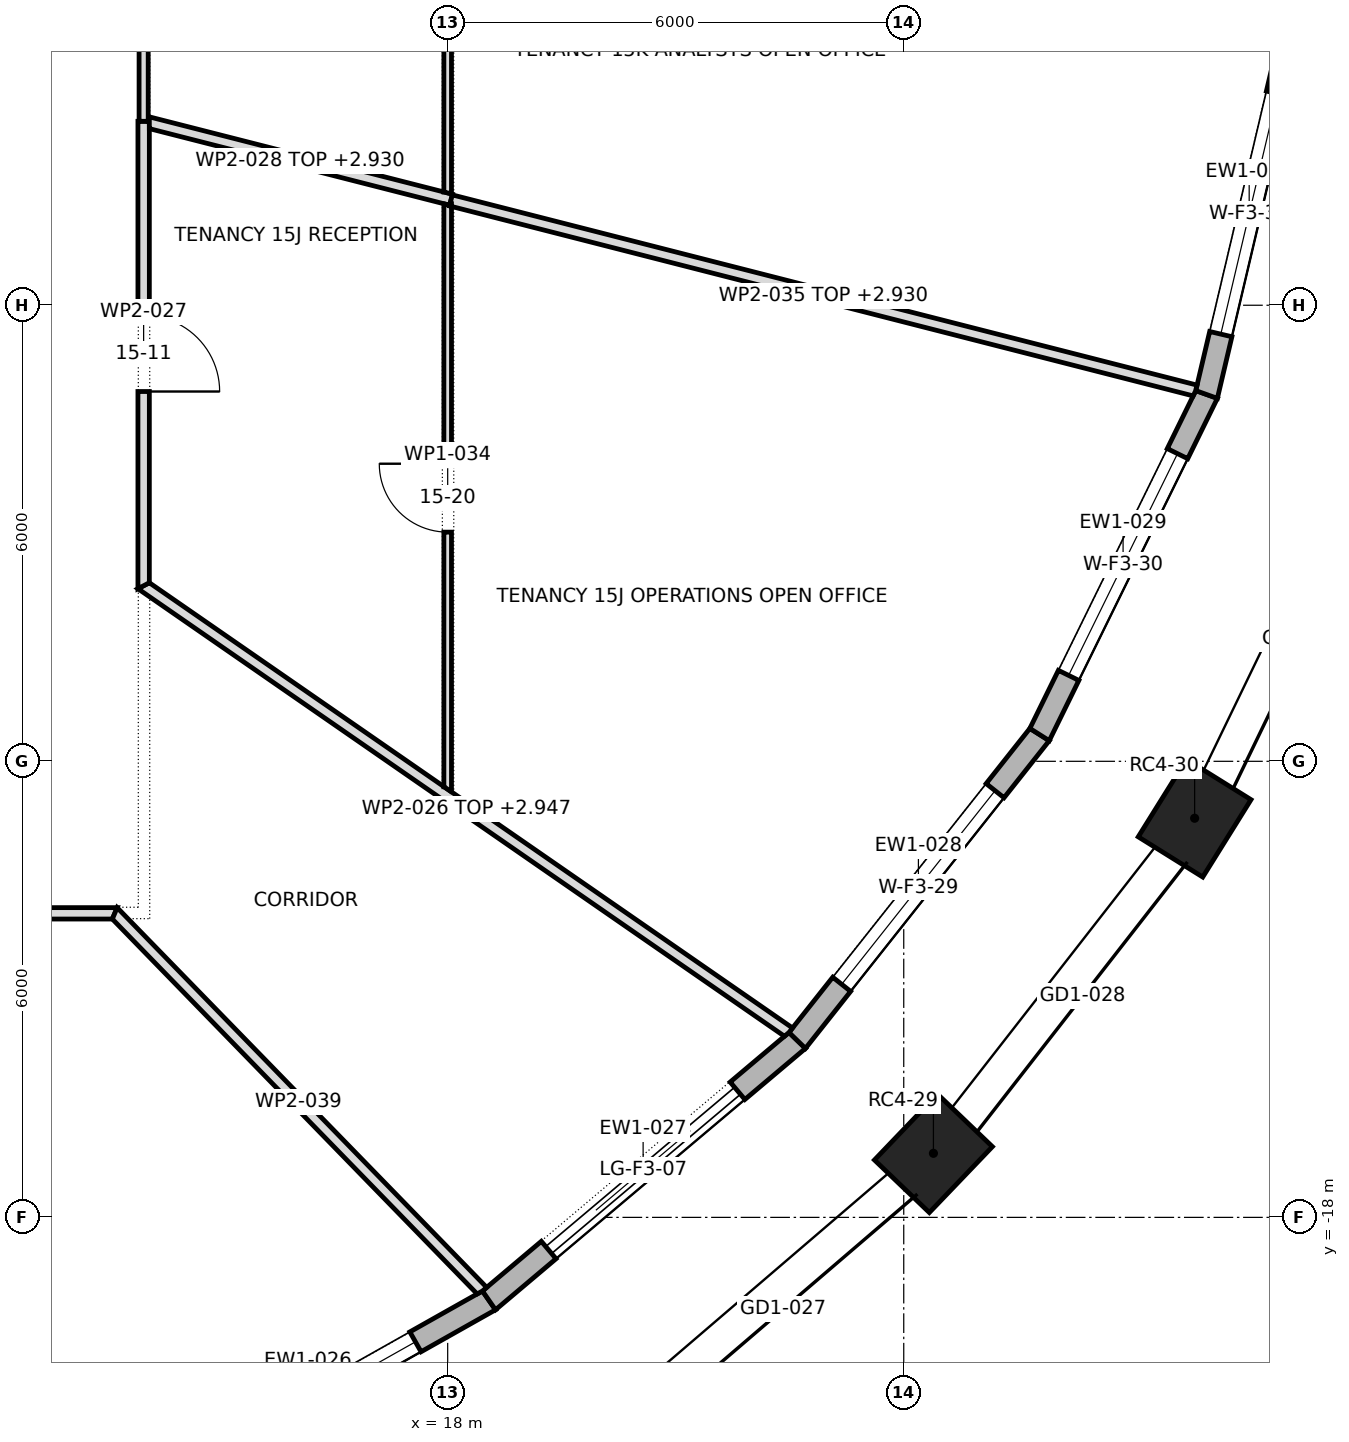
"""IFC4 building model, lengths in metres.
Left out: names, types, materials, properties, quantities, classifications, styles, units other than length and angle.
Written with IfcOpenShell. Run it as: python <this file> out.ifc"""

import sys

from ifc_helpers import new_model, si_unit, direction, frame, frame_2d, origin, origin_2d, place, context, subcontext, project, spatial, polyline, rectangle, outline, extrude, element, fill, save


model = new_model("IFC4")
c1 = context("Model", 3, precision=1e-05, world=origin(), true_north=direction((0.0, 1.0)))
c2 = subcontext(c1, "Body", "Model", "MODEL_VIEW")
j1 = project(units=[si_unit("LENGTHUNIT", "METRE"), si_unit("PLANEANGLEUNIT", "RADIAN")], contexts=[c1])
p1 = place(None, origin())
s1 = spatial("IfcSite", under=j1, at=p1, CompositionType="ELEMENT")
p2 = place(p1, origin())
s2 = spatial("IfcBuilding", under=s1, at=p2, CompositionType="ELEMENT")
p3 = place(p2, frame((0.0, 0.0, 222.9)))
s3 = spatial("IfcBuildingStorey", under=s2, at=p3, CompositionType="ELEMENT", Elevation=222.9)
for number, where, z_axis, x_axis in (
    (1, (24.39, -17.157, 0.0), (0.0, 0.0, 1.0), (0.692, 0.722, 0.0)),
    (2, (27.827, -12.749, 0.0), (0.0, 0.0, 1.0), (0.529, 0.849, 0.0)),
):
    element("IfcColumn", number, at=place(p3, frame(where, z_axis=z_axis, x_axis=x_axis)), inside=s3, PredefinedType="COLUMN", context=c2, shape_type="SweptSolid", body=[
        extrude(rectangle(XDim=1.2, YDim=1.0, at=origin_2d()), origin(), (0.0, 0.0, 1.0), 4.0),
    ])
p4 = place(p3, frame((13.777, -21.778, 0.0), z_axis=(0.0, 0.0, 1.0), x_axis=(0.871207038577, 0.490915772749, 0.0)))
e3 = element("IfcWall", 3, at=p4, inside=s3, PredefinedType="STANDARD", context=c2, shape_type="SweptSolid", body=[
    extrude(outline(polyline([(-0.013, -0.15), (5.485, -0.15), (5.457, 0.15), (0.013, 0.15), (-0.013, -0.15)])), origin(), (0.0, 0.0, 1.0), 3.7),
])
p5 = place(p4, frame((1.111, 0.0, 0.6)))
e4 = element("IfcOpeningElement", 4, at=p5, cuts=e3, PredefinedType="OPENING", context=c2, shape_type="SweptSolid", body=[
    extrude(rectangle(XDim=3.25, YDim=2.65, at=frame_2d((1.625, 1.325))), frame((0.0, 0.162, 0.0), z_axis=(0.0, -1.0, 0.0), x_axis=(1.0, 0.0, 0.0)), (0.0, 0.0, 1.0), 0.324),
])
p6 = place(p3, frame((18.543, -19.092, 0.0), z_axis=(0.0, 0.0, 1.0), x_axis=(0.764397795062, 0.644744919255, 0.0)))
e5 = element("IfcWall", 5, at=p6, inside=s3, PredefinedType="STANDARD", context=c2, shape_type="SweptSolid", body=[
    extrude(outline(polyline([(-0.014, -0.15), (5.32, -0.15), (5.29, 0.15), (0.014, 0.15), (-0.014, -0.15)])), origin(), (0.0, 0.0, 1.0), 3.7),
])
p7 = place(p6, frame((1.028, 0.0, 0.0)))
e6 = element("IfcOpeningElement", 6, at=p7, cuts=e5, PredefinedType="OPENING", context=c2, shape_type="SweptSolid", body=[
    extrude(rectangle(XDim=3.25, YDim=3.25, at=frame_2d((1.625, 1.625))), frame((0.0, 0.162, 0.0), z_axis=(0.0, -1.0, 0.0), x_axis=(1.0, 0.0, 0.0)), (0.0, 0.0, 1.0), 0.324),
])
p8 = place(p3, frame((22.599, -15.672, 0.0), z_axis=(0.0, 0.0, 1.0), x_axis=(0.621017151557, 0.783796974651, 0.0)))
e7 = element("IfcWall", 7, at=p8, inside=s3, PredefinedType="STANDARD", context=c2, shape_type="SweptSolid", body=[
    extrude(outline(polyline([(-0.015, -0.15), (5.15, -0.15), (5.118, 0.15), (0.015, 0.15), (-0.015, -0.15)])), origin(), (0.0, 0.0, 1.0), 3.7),
])
p9 = place(p8, frame((0.942, 0.0, 0.6)))
e8 = element("IfcOpeningElement", 8, at=p9, cuts=e7, PredefinedType="OPENING", context=c2, shape_type="SweptSolid", body=[
    extrude(rectangle(XDim=3.25, YDim=2.65, at=frame_2d((1.625, 1.325))), frame((0.0, 0.162, 0.0), z_axis=(0.0, -1.0, 0.0), x_axis=(1.0, 0.0, 0.0)), (0.0, 0.0, 1.0), 0.324),
])
p10 = place(p3, frame((25.787, -11.648, 0.0), z_axis=(0.0, 0.0, 1.0), x_axis=(0.440795186599, 0.897607711348, 0.0)))
e9 = element("IfcWall", 9, at=p10, inside=s3, PredefinedType="STANDARD", context=c2, shape_type="SweptSolid", body=[
    extrude(outline(polyline([(-0.016, -0.15), (5.001, -0.15), (4.967, 0.15), (0.016, 0.15), (-0.016, -0.15)])), origin(), (0.0, 0.0, 1.0), 3.7),
])
p11 = place(p10, frame((0.867, 0.0, 0.6)))
e10 = element("IfcOpeningElement", 10, at=p11, cuts=e9, PredefinedType="OPENING", context=c2, shape_type="SweptSolid", body=[
    extrude(rectangle(XDim=3.25, YDim=2.65, at=frame_2d((1.625, 1.325))), frame((0.0, 0.162, 0.0), z_axis=(0.0, -1.0, 0.0), x_axis=(1.0, 0.0, 0.0)), (0.0, 0.0, 1.0), 0.324),
])
p12 = place(p3, frame((27.984, -7.174, 0.0), z_axis=(0.0, 0.0, 1.0), x_axis=(0.229546618766, 0.97329766763, 0.0)))
e11 = element("IfcWall", 11, at=p12, inside=s3, PredefinedType="STANDARD", context=c2, shape_type="SweptSolid", body=[
    extrude(outline(polyline([(-0.017, -0.15), (4.899, -0.15), (4.865, 0.15), (0.017, 0.15), (-0.017, -0.15)])), origin(), (0.0, 0.0, 1.0), 3.7),
])
p13 = place(p12, frame((0.816, 0.0, 0.6)))
e12 = element("IfcOpeningElement", 12, at=p13, cuts=e11, PredefinedType="OPENING", context=c2, shape_type="SweptSolid", body=[
    extrude(rectangle(XDim=3.25, YDim=2.65, at=frame_2d((1.625, 1.325))), frame((0.0, 0.162, 0.0), z_axis=(0.0, -1.0, 0.0), x_axis=(1.0, 0.0, 0.0)), (0.0, 0.0, 1.0), 0.324),
])
p14 = place(p3, frame((-13.652, -14.0, 0.0), z_axis=(0.0, 0.0, 1.0), x_axis=(1.0, 0.0, 0.0)))
e13 = element("IfcWall", 13, at=p14, inside=s3, PredefinedType="PARTITIONING", context=c2, shape_type="SweptSolid", body=[
    extrude(outline(polyline([(0.063, -0.075), (2.004, -0.075), (3.946, -0.075), (5.887, -0.075), (7.828, -0.075), (9.769, -0.075), (11.71, -0.075), (13.652, -0.075), (15.593, -0.075), (17.534, -0.075), (19.475, -0.075), (21.417, -0.075), (23.358, -0.075), (25.299, -0.075), (27.24, -0.075), (27.303, 0.075), (27.303, 0.075), (25.353, 0.075), (23.403, 0.075), (21.453, 0.075), (19.502, 0.075), (17.552, 0.075), (15.602, 0.075), (13.652, 0.075), (11.701, 0.075), (9.751, 0.075), (7.801, 0.075), (5.851, 0.075), (3.9, 0.075), (1.95, 0.075), (0.0, 0.075), (0.0, 0.075), (0.063, -0.075)])), origin(), (0.0, 0.0, 1.0), 3.7),
])
p15 = place(p14, frame((5.527, 0.0, 0.0)))
e14 = element("IfcOpeningElement", 14, at=p15, cuts=e13, PredefinedType="OPENING", context=c2, shape_type="SweptSolid", body=[
    extrude(rectangle(XDim=1.0, YDim=2.1, at=frame_2d((0.5, 1.05))), frame((0.0, 0.087, 0.0), z_axis=(0.0, -1.0, 0.0), x_axis=(1.0, 0.0, 0.0)), (0.0, 0.0, 1.0), 0.174),
])
p16 = place(p14, frame((14.857, 0.0, 0.0)))
e15 = element("IfcOpeningElement", 15, at=p16, cuts=e13, PredefinedType="OPENING", context=c2, shape_type="SweptSolid", body=[
    extrude(rectangle(XDim=1.0, YDim=2.1, at=frame_2d((0.5, 1.05))), frame((0.0, 0.087, 0.0), z_axis=(0.0, -1.0, 0.0), x_axis=(1.0, 0.0, 0.0)), (0.0, 0.0, 1.0), 0.174),
])
p17 = place(p14, frame((22.482, 0.0, 0.0)))
e16 = element("IfcOpeningElement", 16, at=p17, cuts=e13, PredefinedType="OPENING", context=c2, shape_type="SweptSolid", body=[
    extrude(rectangle(XDim=1.0, YDim=2.1, at=frame_2d((0.5, 1.05))), frame((0.0, 0.087, 0.0), z_axis=(0.0, -1.0, 0.0), x_axis=(1.0, 0.0, 0.0)), (0.0, 0.0, 1.0), 0.174),
])
p18 = place(p3, frame((13.968, -9.667, 0.0), z_axis=(0.0, 0.0, 1.0), x_axis=(0.822219313141, -0.56917080134, 0.0)))
e17 = element("IfcWall", 17, at=p18, inside=s3, PredefinedType="PARTITIONING", context=c2, shape_type="SweptSolid", body=[
    extrude(outline(polyline([(0.0, -0.075), (1.724, -0.075), (3.448, -0.075), (5.173, -0.075), (6.897, -0.075), (8.621, -0.075), (10.345, -0.075), (10.365, 0.0), (10.37, 0.066), (10.37, 0.075), (8.511, 0.075), (6.653, 0.075), (4.795, 0.075), (4.792, 0.073), (4.791, 0.075), (3.22, 0.075), (1.65, 0.075), (0.079, 0.075), (0.039, -0.0), (0.0, -0.075)])), origin(), (0.0, 0.0, 1.0), 2.947),
])
p19 = place(p3, frame((14.0, -3.58, 0.0), z_axis=(0.0, 0.0, 1.0), x_axis=(0.0, -1.0, 0.0)))
e18 = element("IfcWall", 18, at=p19, inside=s3, PredefinedType="PARTITIONING", context=c2, shape_type="SweptSolid", body=[
    extrude(outline(polyline([(6.149, -0.075), (6.149, -0.075), (6.071, 0.075), (4.553, 0.075), (3.035, 0.075), (1.518, 0.075), (0.0, 0.075), (0.0, -0.075), (1.537, -0.075), (3.075, -0.075), (4.612, -0.075), (6.149, -0.075)])), origin(), (0.0, 0.0, 1.0), 3.7),
])
p20 = place(p19, frame((2.555, 0.0, 0.0)))
e19 = element("IfcOpeningElement", 19, at=p20, cuts=e18, PredefinedType="OPENING", context=c2, shape_type="SweptSolid", body=[
    extrude(rectangle(XDim=1.0, YDim=2.1, at=frame_2d((0.5, 1.05))), frame((0.0, 0.087, 0.0), z_axis=(0.0, -1.0, 0.0), x_axis=(1.0, 0.0, 0.0)), (0.0, 0.0, 1.0), 0.174),
])
p21 = place(p3, frame((14.042, -3.591, 0.0), z_axis=(0.0, 0.0, 1.0), x_axis=(0.968991510142, -0.247094017071, 0.0)))
e20 = element("IfcWall", 20, at=p21, inside=s3, PredefinedType="PARTITIONING", context=c2, shape_type="SweptSolid", body=[
    extrude(outline(polyline([(4.131, 0.075), (4.015, 0.075), (4.014, 0.075), (4.014, 0.075), (2.676, 0.075), (1.338, 0.075), (0.0, 0.075), (0.0, 0.074), (0.015, 0.015), (0.03, 0.019), (0.053, -0.075), (1.413, -0.075), (2.772, -0.075), (4.131, -0.075), (4.131, 0.075)])), origin(), (0.0, 0.0, 1.0), 2.93),
])
p22 = place(p3, frame((14.0, -0.26, 0.0), z_axis=(0.0, 0.0, 1.0), x_axis=(0.0, -1.0, 0.0)))
e21 = element("IfcWall", 21, at=p22, inside=s3, PredefinedType="PARTITIONING", context=c2, shape_type="SweptSolid", body=[
    extrude(rectangle(XDim=3.32, YDim=0.12, at=frame_2d((1.66, 0.0))), origin(), (0.0, 0.0, 1.0), 3.7),
])
p23 = place(p22, frame((1.16, 0.0, 0.0)))
e22 = element("IfcOpeningElement", 22, at=p23, cuts=e21, PredefinedType="OPENING", context=c2, shape_type="SweptSolid", body=[
    extrude(rectangle(XDim=1.0, YDim=2.1, at=frame_2d((0.5, 1.05))), frame((0.0, 0.072, 0.0), z_axis=(0.0, -1.0, 0.0), x_axis=(1.0, 0.0, 0.0)), (0.0, 0.0, 1.0), 0.144),
])
p24 = place(p3, frame((18.0, -4.665, 0.0), z_axis=(0.0, 0.0, 1.0), x_axis=(0.0, -1.0, 0.0)))
e23 = element("IfcWall", 23, at=p24, inside=s3, PredefinedType="PARTITIONING", context=c2, shape_type="SweptSolid", body=[
    extrude(outline(polyline([(0.0, -0.05), (1.917, -0.05), (3.834, -0.05), (5.751, -0.05), (7.668, -0.05), (7.737, 0.05), (7.737, 0.05), (5.812, 0.05), (3.886, 0.05), (1.961, 0.05), (0.035, 0.05), (0.029, 0.025), (0.0, 0.032), (0.0, 0.031), (0.019, 0.026), (0.0, -0.048), (0.0, -0.05)])), origin(), (0.0, 0.0, 1.0), 3.7),
])
p25 = place(p24, frame((3.42, 0.0, 0.0)))
e24 = element("IfcOpeningElement", 24, at=p25, cuts=e23, PredefinedType="OPENING", context=c2, shape_type="SweptSolid", body=[
    extrude(rectangle(XDim=0.9, YDim=2.1, at=frame_2d((0.45, 1.05))), frame((0.0, 0.062, 0.0), z_axis=(0.0, -1.0, 0.0), x_axis=(1.0, 0.0, 0.0)), (0.0, 0.0, 1.0), 0.124),
])
p26 = place(p3, frame((18.042, -4.621, 0.0), z_axis=(0.0, 0.0, 1.0), x_axis=(0.968898746972, -0.247457507698, 0.0)))
e25 = element("IfcWall", 25, at=p26, inside=s3, PredefinedType="PARTITIONING", context=c2, shape_type="SweptSolid", body=[
    extrude(outline(polyline([(0.027, -0.075), (1.706, -0.075), (3.385, -0.075), (5.063, -0.075), (6.741, -0.075), (8.42, -0.075), (10.098, -0.075), (10.113, -0.008), (10.113, 0.075), (8.427, 0.075), (6.742, 0.075), (5.056, 0.075), (3.371, 0.075), (1.686, 0.075), (0.0, 0.075), (0.0, -0.045), (0.019, -0.041), (0.027, -0.075)])), origin(), (0.0, 0.0, 1.0), 2.93),
])
p27 = place(p3, frame((18.0, -4.535, 0.0), z_axis=(0.0, 0.0, 1.0), x_axis=(0.0, 1.0, 0.0)))
e26 = element("IfcWall", 26, at=p27, inside=s3, PredefinedType="PARTITIONING", context=c2, shape_type="SweptSolid", body=[
    extrude(outline(polyline([(9.08, -0.05), (9.08, -0.048), (9.06, 0.03), (9.08, 0.035), (9.08, 0.036), (9.05, 0.029), (9.045, 0.05), (7.471, 0.05), (5.898, 0.05), (4.325, 0.05), (4.325, 0.05), (4.225, 0.05), (4.225, 0.05), (2.825, 0.05), (1.425, 0.05), (0.025, 0.05), (0.0, -0.048), (0.0, -0.05), (1.816, -0.05), (3.632, -0.05), (5.448, -0.05), (7.264, -0.05), (9.08, -0.05)])), origin(), (0.0, 0.0, 1.0), 3.7),
])
p28 = place(p27, frame((6.255, 0.0, 0.0)))
e27 = element("IfcOpeningElement", 27, at=p28, cuts=e26, PredefinedType="OPENING", context=c2, shape_type="SweptSolid", body=[
    extrude(rectangle(XDim=0.9, YDim=2.1, at=frame_2d((0.45, 1.05))), frame((0.0, 0.062, 0.0), z_axis=(0.0, -1.0, 0.0), x_axis=(1.0, 0.0, 0.0)), (0.0, 0.0, 1.0), 0.124),
])
p29 = place(p3, frame((18.459, -18.973, 0.0), z_axis=(0.0, 0.0, 1.0), x_axis=(-0.697374409368, 0.716707006494, 0.0)))
e28 = element("IfcWall", 28, at=p29, inside=s3, PredefinedType="PARTITIONING", context=c2, shape_type="SweptSolid", body=[
    extrude(outline(polyline([(0.0, -0.075), (1.743, -0.075), (3.485, -0.075), (5.228, -0.075), (6.971, -0.075), (6.939, 0.0), (6.907, 0.075), (5.187, 0.075), (3.466, 0.075), (1.746, 0.075), (0.025, 0.075), (0.005, -0.002), (0.0, -0.069), (0.0, -0.075)])), origin(), (0.0, 0.0, 1.0), 3.7),
])
p30 = place(p5, origin())
e29 = element("IfcWindow", 29, at=p30, inside=s3, PartitioningType="TRIPLE_PANEL_VERTICAL", PredefinedType="WINDOW", context=c2, shape_type="SweptSolid", body=[
    extrude(rectangle(XDim=3.25, YDim=2.65, at=frame_2d((1.625, 1.325))), frame((0.0, 0.03, 0.0), z_axis=(0.0, -1.0, 0.0), x_axis=(1.0, 0.0, 0.0)), (0.0, 0.0, 1.0), 0.06),
])
fill(e4, e29)
p31 = place(p7, origin())
e30 = element("IfcDoor", 30, at=p31, inside=s3, OperationType="DOUBLE_DOOR_SLIDING", PredefinedType="DOOR", context=c2, shape_type="SweptSolid", body=[
    extrude(rectangle(XDim=3.25, YDim=3.25, at=frame_2d((1.625, 1.625))), frame((0.0, 0.025, 0.0), z_axis=(0.0, -1.0, 0.0), x_axis=(1.0, 0.0, 0.0)), (0.0, 0.0, 1.0), 0.05),
])
fill(e6, e30)
p32 = place(p9, origin())
e31 = element("IfcWindow", 31, at=p32, inside=s3, PartitioningType="TRIPLE_PANEL_VERTICAL", PredefinedType="WINDOW", context=c2, shape_type="SweptSolid", body=[
    extrude(rectangle(XDim=3.25, YDim=2.65, at=frame_2d((1.625, 1.325))), frame((0.0, 0.03, 0.0), z_axis=(0.0, -1.0, 0.0), x_axis=(1.0, 0.0, 0.0)), (0.0, 0.0, 1.0), 0.06),
])
fill(e8, e31)
p33 = place(p11, origin())
e32 = element("IfcWindow", 32, at=p33, inside=s3, PartitioningType="TRIPLE_PANEL_VERTICAL", PredefinedType="WINDOW", context=c2, shape_type="SweptSolid", body=[
    extrude(rectangle(XDim=3.25, YDim=2.65, at=frame_2d((1.625, 1.325))), frame((0.0, 0.03, 0.0), z_axis=(0.0, -1.0, 0.0), x_axis=(1.0, 0.0, 0.0)), (0.0, 0.0, 1.0), 0.06),
])
fill(e10, e32)
p34 = place(p13, origin())
e33 = element("IfcWindow", 33, at=p34, inside=s3, PartitioningType="TRIPLE_PANEL_VERTICAL", PredefinedType="WINDOW", context=c2, shape_type="SweptSolid", body=[
    extrude(rectangle(XDim=3.25, YDim=2.65, at=frame_2d((1.625, 1.325))), frame((0.0, 0.03, 0.0), z_axis=(0.0, -1.0, 0.0), x_axis=(1.0, 0.0, 0.0)), (0.0, 0.0, 1.0), 0.06),
])
fill(e12, e33)
p35 = place(p20, origin())
e34 = element("IfcDoor", 34, at=p35, inside=s3, OperationType="SINGLE_SWING_LEFT", PredefinedType="DOOR", context=c2, shape_type="SweptSolid", body=[
    extrude(rectangle(XDim=1.0, YDim=2.1, at=frame_2d((0.5, 1.05))), frame((0.0, 0.025, 0.0), z_axis=(0.0, -1.0, 0.0), x_axis=(1.0, 0.0, 0.0)), (0.0, 0.0, 1.0), 0.05),
])
fill(e19, e34)
p36 = place(p25, frame((0.9, 0.0, 0.0), z_axis=(0.0, 0.0, 1.0), x_axis=(-1.0, 0.0, 0.0)))
e35 = element("IfcDoor", 35, at=p36, inside=s3, OperationType="SINGLE_SWING_LEFT", PredefinedType="DOOR", context=c2, shape_type="SweptSolid", body=[
    extrude(rectangle(XDim=0.9, YDim=2.1, at=frame_2d((0.45, 1.05))), frame((0.0, 0.025, 0.0), z_axis=(0.0, -1.0, 0.0), x_axis=(1.0, 0.0, 0.0)), (0.0, 0.0, 1.0), 0.05),
])
fill(e24, e35)
save(model, sys.argv[1])
